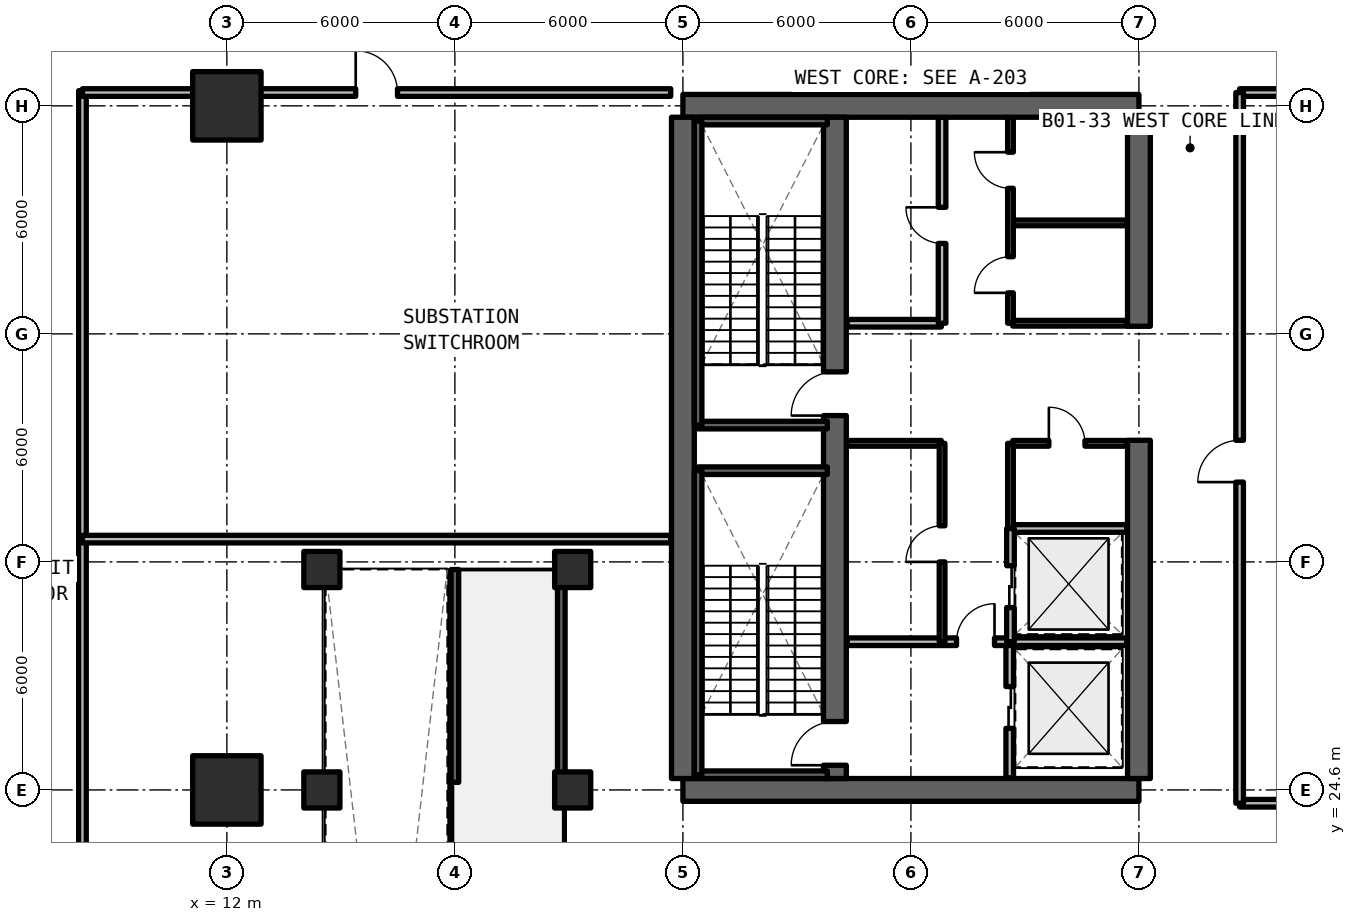
"""IFC4 building model, lengths in metres.
Left out: names, types, materials, properties, quantities, classifications, styles, units other than length and angle.
Written with IfcOpenShell. Run it as: python <this file> out.ifc"""

import sys

from ifc_helpers import new_model, si_unit, direction, frame, frame_2d, origin, origin_2d, place, context, subcontext, project, spatial, rectangle, extrude, element, fill, save


model = new_model("IFC4")
c1 = context("Model", 3, precision=1e-05, world=origin(), true_north=direction((0.0, 1.0)))
c2 = subcontext(c1, "Body", "Model", "MODEL_VIEW")
j1 = project(units=[si_unit("LENGTHUNIT", "METRE"), si_unit("PLANEANGLEUNIT", "RADIAN")], contexts=[c1])
p1 = place(None, origin())
s1 = spatial("IfcSite", under=j1, at=p1, CompositionType="ELEMENT")
p2 = place(p1, origin())
s2 = spatial("IfcBuilding", under=s1, at=p2, CompositionType="ELEMENT")
p3 = place(p2, frame((0.0, 0.0, -4.62)))
s3 = spatial("IfcBuildingStorey", under=s2, at=p3, CompositionType="ELEMENT", Elevation=-4.62)
for number, where, z_axis, x_axis in (
    (1, (24.0, 24.6, 0.0), (0.0, 0.0, 1.0), (1.0, 0.0, 0.0)),
    (2, (36.0, 42.6, 0.0), (0.0, 0.0, 1.0), (-1.0, 0.0, 0.0)),
):
    element("IfcWall", number, at=place(p3, frame(where, z_axis=z_axis, x_axis=x_axis)), inside=s3, PredefinedType="SHEAR", context=c2, shape_type="SweptSolid", body=[
        extrude(rectangle(XDim=12.0, YDim=0.6, at=frame_2d((6.0, 0.0))), origin(), (0.0, 0.0, 1.0), 4.62),
    ])
p4 = place(p3, frame((24.0, 24.9, 0.0), z_axis=(0.0, 0.0, 1.0), x_axis=(0.0, 1.0, 0.0)))
e3 = element("IfcWall", 3, at=p4, inside=s3, PredefinedType="SHEAR", context=c2, shape_type="SweptSolid", body=[
    extrude(rectangle(XDim=17.4, YDim=0.6, at=frame_2d((8.7, 0.0))), origin(), (0.0, 0.0, 1.0), 4.62),
])
p5 = place(p3, frame((36.0, 24.9, 0.0), z_axis=(0.0, 0.0, 1.0), x_axis=(0.0, 1.0, 0.0)))
e4 = element("IfcWall", 4, at=p5, inside=s3, PredefinedType="SHEAR", context=c2, shape_type="SweptSolid", body=[
    extrude(rectangle(XDim=8.9, YDim=0.6, at=frame_2d((4.45, 0.0))), origin(), (0.0, 0.0, 1.0), 4.62),
])
p6 = place(p3, frame((36.0, 36.8, 0.0), z_axis=(0.0, 0.0, 1.0), x_axis=(0.0, 1.0, 0.0)))
e5 = element("IfcWall", 5, at=p6, inside=s3, PredefinedType="SHEAR", context=c2, shape_type="SweptSolid", body=[
    extrude(rectangle(XDim=5.5, YDim=0.6, at=frame_2d((2.75, 0.0))), origin(), (0.0, 0.0, 1.0), 4.62),
])
p7 = place(p3, frame((28.0, 24.9, 0.0), z_axis=(0.0, 0.0, 1.0), x_axis=(0.0, 1.0, 0.0)))
e6 = element("IfcWall", 6, at=p7, inside=s3, PredefinedType="SHEAR", context=c2, shape_type="SweptSolid", body=[
    extrude(rectangle(XDim=17.4, YDim=0.6, at=frame_2d((8.7, 0.0))), origin(), (0.0, 0.0, 1.0), 4.62),
])
p8 = place(p7, frame((0.35, 0.0, 0.0)))
e7 = element("IfcOpeningElement", 7, at=p8, cuts=e6, PredefinedType="OPENING", context=c2, shape_type="SweptSolid", body=[
    extrude(rectangle(XDim=1.15, YDim=2.15, at=frame_2d((0.575, 1.075))), frame((0.0, 0.31, 0.0), z_axis=(0.0, -1.0, 0.0), x_axis=(1.0, 0.0, 0.0)), (0.0, 0.0, 1.0), 0.62),
])
p9 = place(p7, frame((9.55, 0.0, 0.0)))
e8 = element("IfcOpeningElement", 8, at=p9, cuts=e6, PredefinedType="OPENING", context=c2, shape_type="SweptSolid", body=[
    extrude(rectangle(XDim=1.15, YDim=2.15, at=frame_2d((0.575, 1.075))), frame((0.0, 0.31, 0.0), z_axis=(0.0, -1.0, 0.0), x_axis=(1.0, 0.0, 0.0)), (0.0, 0.0, 1.0), 0.62),
])
for number, where, z_axis, x_axis in (
    (9, (12.0, 24.6, 0.0), (0.0, 0.0, 1.0), (1.0, 0.0, 0.0)),
    (10, (12.0, 42.6, 0.0), (0.0, 0.0, 1.0), (1.0, 0.0, 0.0)),
):
    element("IfcColumn", number, at=place(p3, frame(where, z_axis=z_axis, x_axis=x_axis)), inside=s3, PredefinedType="COLUMN", context=c2, shape_type="SweptSolid", body=[
        extrude(rectangle(XDim=1.8, YDim=1.8, at=origin_2d()), origin(), (0.0, 0.0, 1.0), 4.62),
    ])
for number, where, z_axis, x_axis in (
    (11, (14.5, 30.4, 0.0), (0.0, 0.0, 1.0), (1.0, 0.0, 0.0)),
    (12, (21.1, 30.4, 0.0), (0.0, 0.0, 1.0), (1.0, 0.0, 0.0)),
    (13, (14.5, 24.6, 0.0), (0.0, 0.0, 1.0), (1.0, 0.0, 0.0)),
    (14, (21.1, 24.6, 0.0), (0.0, 0.0, 1.0), (1.0, 0.0, 0.0)),
):
    element("IfcColumn", number, at=place(p3, frame(where, z_axis=z_axis, x_axis=x_axis)), inside=s3, PredefinedType="COLUMN", context=c2, shape_type="SweptSolid", body=[
        extrude(rectangle(XDim=0.95, YDim=0.95, at=origin_2d()), origin(), (0.0, 0.0, 1.0), 4.34),
    ])
p10 = place(p3, frame((32.6, 24.92, 0.0), z_axis=(0.0, 0.0, 1.0), x_axis=(0.0, 1.0, 0.0)))
e15 = element("IfcWall", 15, at=p10, inside=s3, PredefinedType="SOLIDWALL", context=c2, shape_type="SweptSolid", body=[
    extrude(rectangle(XDim=3.58, YDim=0.2, at=frame_2d((1.79, 0.0))), origin(), (0.0, 0.0, 1.0), 3.56),
])
p11 = place(p10, frame((1.3, 0.0, 0.0)))
e16 = element("IfcOpeningElement", 16, at=p11, cuts=e15, PredefinedType="OPENING", context=c2, shape_type="SweptSolid", body=[
    extrude(rectangle(XDim=1.1, YDim=2.2, at=frame_2d((0.55, 1.1))), frame((0.0, 0.11, 0.0), z_axis=(0.0, -1.0, 0.0), x_axis=(1.0, 0.0, 0.0)), (0.0, 0.0, 1.0), 0.22),
])
p12 = place(p3, frame((28.32, 28.5, 0.0), z_axis=(0.0, 0.0, 1.0), x_axis=(1.0, 0.0, 0.0)))
e17 = element("IfcWall", 17, at=p12, inside=s3, PredefinedType="SOLIDWALL", context=c2, shape_type="SweptSolid", body=[
    extrude(rectangle(XDim=7.36, YDim=0.2, at=frame_2d((3.68, 0.0))), origin(), (0.0, 0.0, 1.0), 3.56),
])
p13 = place(p12, frame((2.88, 0.0, 0.0)))
e18 = element("IfcOpeningElement", 18, at=p13, cuts=e17, PredefinedType="OPENING", context=c2, shape_type="SweptSolid", body=[
    extrude(rectangle(XDim=1.0, YDim=2.15, at=frame_2d((0.5, 1.075))), frame((0.0, 0.11, 0.0), z_axis=(0.0, -1.0, 0.0), x_axis=(1.0, 0.0, 0.0)), (0.0, 0.0, 1.0), 0.22),
])
p14 = place(p3, frame((28.32, 33.72, 0.0), z_axis=(0.0, 0.0, 1.0), x_axis=(1.0, 0.0, 0.0)))
e19 = element("IfcWall", 19, at=p14, inside=s3, PredefinedType="SOLIDWALL", context=c2, shape_type="SweptSolid", body=[
    extrude(rectangle(XDim=2.48, YDim=0.15, at=frame_2d((1.24, 0.0))), origin(), (0.0, 0.0, 1.0), 3.56),
])
p15 = place(p3, frame((30.82, 28.5, 0.0), z_axis=(0.0, 0.0, 1.0), x_axis=(0.0, 1.0, 0.0)))
e20 = element("IfcWall", 20, at=p15, inside=s3, PredefinedType="SOLIDWALL", context=c2, shape_type="SweptSolid", body=[
    extrude(rectangle(XDim=5.22, YDim=0.15, at=frame_2d((2.61, 0.0))), origin(), (0.0, 0.0, 1.0), 3.56),
])
p16 = place(p15, frame((2.1, 0.0, 0.0)))
e21 = element("IfcOpeningElement", 21, at=p16, cuts=e20, PredefinedType="OPENING", context=c2, shape_type="SweptSolid", body=[
    extrude(rectangle(XDim=0.95, YDim=2.15, at=frame_2d((0.475, 1.075))), frame((0.0, 0.085, 0.0), z_axis=(0.0, -1.0, 0.0), x_axis=(1.0, 0.0, 0.0)), (0.0, 0.0, 1.0), 0.17),
])
p17 = place(p3, frame((32.68, 31.48, 0.0), z_axis=(0.0, 0.0, 1.0), x_axis=(1.0, 0.0, 0.0)))
e22 = element("IfcWall", 22, at=p17, inside=s3, PredefinedType="SOLIDWALL", context=c2, shape_type="SweptSolid", body=[
    extrude(rectangle(XDim=3.0, YDim=0.2, at=frame_2d((1.5, 0.0))), origin(), (0.0, 0.0, 1.0), 3.56),
])
p18 = place(p3, frame((32.62, 28.5, 0.0), z_axis=(0.0, 0.0, 1.0), x_axis=(0.0, 1.0, 0.0)))
e23 = element("IfcWall", 23, at=p18, inside=s3, PredefinedType="SOLIDWALL", context=c2, shape_type="SweptSolid", body=[
    extrude(rectangle(XDim=2.98, YDim=0.2, at=frame_2d((1.49, 0.0))), origin(), (0.0, 0.0, 1.0), 3.56),
])
p19 = place(p18, frame((0.9, 0.0, 0.0)))
e24 = element("IfcOpeningElement", 24, at=p19, cuts=e23, PredefinedType="OPENING", context=c2, shape_type="SweptSolid", body=[
    extrude(rectangle(XDim=1.1, YDim=2.2, at=frame_2d((0.55, 1.1))), frame((0.0, 0.11, 0.0), z_axis=(0.0, -1.0, 0.0), x_axis=(1.0, 0.0, 0.0)), (0.0, 0.0, 1.0), 0.22),
])
p20 = place(p3, frame((32.62, 31.48, 0.0), z_axis=(0.0, 0.0, 1.0), x_axis=(0.0, 1.0, 0.0)))
e25 = element("IfcWall", 25, at=p20, inside=s3, PredefinedType="SOLIDWALL", context=c2, shape_type="SweptSolid", body=[
    extrude(rectangle(XDim=2.24, YDim=0.15, at=frame_2d((1.12, 0.0))), origin(), (0.0, 0.0, 1.0), 3.56),
])
p21 = place(p3, frame((32.68, 33.72, 0.0), z_axis=(0.0, 0.0, 1.0), x_axis=(1.0, 0.0, 0.0)))
e26 = element("IfcWall", 26, at=p21, inside=s3, PredefinedType="SOLIDWALL", context=c2, shape_type="SweptSolid", body=[
    extrude(rectangle(XDim=3.0, YDim=0.15, at=frame_2d((1.5, 0.0))), origin(), (0.0, 0.0, 1.0), 3.56),
])
p22 = place(p21, frame((0.95, 0.0, 0.0)))
e27 = element("IfcOpeningElement", 27, at=p22, cuts=e26, PredefinedType="OPENING", context=c2, shape_type="SweptSolid", body=[
    extrude(rectangle(XDim=0.95, YDim=2.15, at=frame_2d((0.475, 1.075))), frame((0.0, 0.085, 0.0), z_axis=(0.0, -1.0, 0.0), x_axis=(1.0, 0.0, 0.0)), (0.0, 0.0, 1.0), 0.17),
])
p23 = place(p3, frame((28.32, 36.88, 0.0), z_axis=(0.0, 0.0, 1.0), x_axis=(1.0, 0.0, 0.0)))
e28 = element("IfcWall", 28, at=p23, inside=s3, PredefinedType="SOLIDWALL", context=c2, shape_type="SweptSolid", body=[
    extrude(rectangle(XDim=2.48, YDim=0.2, at=frame_2d((1.24, 0.0))), origin(), (0.0, 0.0, 1.0), 3.56),
])
p24 = place(p3, frame((30.82, 36.88, 0.0), z_axis=(0.0, 0.0, 1.0), x_axis=(0.0, 1.0, 0.0)))
e29 = element("IfcWall", 29, at=p24, inside=s3, PredefinedType="SOLIDWALL", context=c2, shape_type="SweptSolid", body=[
    extrude(rectangle(XDim=5.42, YDim=0.2, at=frame_2d((2.71, 0.0))), origin(), (0.0, 0.0, 1.0), 3.56),
])
p25 = place(p24, frame((2.1, 0.0, 0.0)))
e30 = element("IfcOpeningElement", 30, at=p25, cuts=e29, PredefinedType="OPENING", context=c2, shape_type="SweptSolid", body=[
    extrude(rectangle(XDim=0.95, YDim=2.15, at=frame_2d((0.475, 1.075))), frame((0.0, 0.11, 0.0), z_axis=(0.0, -1.0, 0.0), x_axis=(1.0, 0.0, 0.0)), (0.0, 0.0, 1.0), 0.22),
])
for number, where, z_axis, x_axis in (
    (31, (32.68, 36.88, 0.0), (0.0, 0.0, 1.0), (1.0, 0.0, 0.0)),
    (32, (32.68, 39.52, 0.0), (0.0, 0.0, 1.0), (1.0, 0.0, 0.0)),
):
    element("IfcWall", number, at=place(p3, frame(where, z_axis=z_axis, x_axis=x_axis)), inside=s3, PredefinedType="SOLIDWALL", context=c2, shape_type="SweptSolid", body=[
        extrude(rectangle(XDim=3.0, YDim=0.15, at=frame_2d((1.5, 0.0))), origin(), (0.0, 0.0, 1.0), 3.56),
    ])
p26 = place(p3, frame((32.62, 36.88, 0.0), z_axis=(0.0, 0.0, 1.0), x_axis=(0.0, 1.0, 0.0)))
e33 = element("IfcWall", 33, at=p26, inside=s3, PredefinedType="SOLIDWALL", context=c2, shape_type="SweptSolid", body=[
    extrude(rectangle(XDim=5.42, YDim=0.15, at=frame_2d((2.71, 0.0))), origin(), (0.0, 0.0, 1.0), 3.56),
])
p27 = place(p26, frame((0.8, 0.0, 0.0)))
e34 = element("IfcOpeningElement", 34, at=p27, cuts=e33, PredefinedType="OPENING", context=c2, shape_type="SweptSolid", body=[
    extrude(rectangle(XDim=0.95, YDim=2.15, at=frame_2d((0.475, 1.075))), frame((0.0, 0.085, 0.0), z_axis=(0.0, -1.0, 0.0), x_axis=(1.0, 0.0, 0.0)), (0.0, 0.0, 1.0), 0.17),
])
p28 = place(p26, frame((3.55, 0.0, 0.0)))
e35 = element("IfcOpeningElement", 35, at=p28, cuts=e33, PredefinedType="OPENING", context=c2, shape_type="SweptSolid", body=[
    extrude(rectangle(XDim=0.95, YDim=2.15, at=frame_2d((0.475, 1.075))), frame((0.0, 0.085, 0.0), z_axis=(0.0, -1.0, 0.0), x_axis=(1.0, 0.0, 0.0)), (0.0, 0.0, 1.0), 0.17),
])
p29 = place(p3, frame((8.2, 15.9, 0.0), z_axis=(0.0, 0.0, 1.0), x_axis=(0.0, 1.0, 0.0)))
e36 = element("IfcWall", 36, at=p29, inside=s3, PredefinedType="SOLIDWALL", context=c2, shape_type="SweptSolid", body=[
    extrude(rectangle(XDim=27.1, YDim=0.2, at=frame_2d((13.55, 0.0))), origin(), (0.0, 0.0, 1.0), 3.56),
])
p30 = place(p3, frame((8.2, 31.2, 0.0), z_axis=(0.0, 0.0, 1.0), x_axis=(1.0, 0.0, 0.0)))
e37 = element("IfcWall", 37, at=p30, inside=s3, PredefinedType="SOLIDWALL", context=c2, shape_type="SweptSolid", body=[
    extrude(rectangle(XDim=15.48, YDim=0.2, at=frame_2d((7.74, 0.0))), origin(), (0.0, 0.0, 1.0), 3.56),
])
p31 = place(p3, frame((8.2, 42.95, 0.0), z_axis=(0.0, 0.0, 1.0), x_axis=(1.0, 0.0, 0.0)))
e38 = element("IfcWall", 38, at=p31, inside=s3, PredefinedType="SOLIDWALL", context=c2, shape_type="SweptSolid", body=[
    extrude(rectangle(XDim=15.48, YDim=0.2, at=frame_2d((7.74, 0.0))), origin(), (0.0, 0.0, 1.0), 3.56),
])
p32 = place(p31, frame((7.19, 0.0, 0.0)))
e39 = element("IfcOpeningElement", 39, at=p32, cuts=e38, PredefinedType="OPENING", context=c2, shape_type="SweptSolid", body=[
    extrude(rectangle(XDim=1.1, YDim=2.15, at=frame_2d((0.55, 1.075))), frame((0.0, 0.11, 0.0), z_axis=(0.0, -1.0, 0.0), x_axis=(1.0, 0.0, 0.0)), (0.0, 0.0, 1.0), 0.22),
])
for number, where, z_axis, x_axis in (
    (40, (38.65, 24.25, 0.0), (0.0, 0.0, 1.0), (1.0, 0.0, 0.0)),
    (41, (38.65, 42.95, 0.0), (0.0, 0.0, 1.0), (1.0, 0.0, 0.0)),
):
    element("IfcWall", number, at=place(p3, frame(where, z_axis=z_axis, x_axis=x_axis)), inside=s3, PredefinedType="SOLIDWALL", context=c2, shape_type="SweptSolid", body=[
        extrude(rectangle(XDim=36.7, YDim=0.2, at=frame_2d((18.35, 0.0))), origin(), (0.0, 0.0, 1.0), 3.56),
    ])
p33 = place(p3, frame((38.65, 24.25, 0.0), z_axis=(0.0, 0.0, 1.0), x_axis=(0.0, 1.0, 0.0)))
e42 = element("IfcWall", 42, at=p33, inside=s3, PredefinedType="SOLIDWALL", context=c2, shape_type="SweptSolid", body=[
    extrude(rectangle(XDim=18.7, YDim=0.2, at=frame_2d((9.35, 0.0))), origin(), (0.0, 0.0, 1.0), 3.56),
])
p34 = place(p33, frame((8.45, 0.0, 0.0)))
e43 = element("IfcOpeningElement", 43, at=p34, cuts=e42, PredefinedType="OPENING", context=c2, shape_type="SweptSolid", body=[
    extrude(rectangle(XDim=1.1, YDim=2.15, at=frame_2d((0.55, 1.075))), frame((0.0, 0.11, 0.0), z_axis=(0.0, -1.0, 0.0), x_axis=(1.0, 0.0, 0.0)), (0.0, 0.0, 1.0), 0.22),
])
for number, where, z_axis, x_axis in (
    (44, (24.4, 25.0, 0.0), (0.0, 0.0, 1.0), (1.0, 0.0, 0.0)),
    (45, (27.8, 33.0, 0.0), (0.0, 0.0, 1.0), (-1.0, 0.0, 0.0)),
):
    element("IfcWall", number, at=place(p3, frame(where, z_axis=z_axis, x_axis=x_axis)), inside=s3, PredefinedType="SOLIDWALL", context=c2, shape_type="SweptSolid", body=[
        extrude(rectangle(XDim=3.4, YDim=0.2, at=frame_2d((1.7, 0.0))), origin(), (0.0, 0.0, 1.0), 4.62),
    ])
p35 = place(p3, frame((24.4, 33.0, 0.0), z_axis=(0.0, 0.0, 1.0), x_axis=(0.0, -1.0, 0.0)))
e46 = element("IfcWall", 46, at=p35, inside=s3, PredefinedType="SOLIDWALL", context=c2, shape_type="SweptSolid", body=[
    extrude(rectangle(XDim=8.0, YDim=0.2, at=frame_2d((4.0, 0.0))), origin(), (0.0, 0.0, 1.0), 4.62),
])
for number, where, z_axis, x_axis in (
    (47, (24.4, 34.2, 0.0), (0.0, 0.0, 1.0), (1.0, 0.0, 0.0)),
    (48, (27.8, 42.2, 0.0), (0.0, 0.0, 1.0), (-1.0, 0.0, 0.0)),
):
    element("IfcWall", number, at=place(p3, frame(where, z_axis=z_axis, x_axis=x_axis)), inside=s3, PredefinedType="SOLIDWALL", context=c2, shape_type="SweptSolid", body=[
        extrude(rectangle(XDim=3.4, YDim=0.2, at=frame_2d((1.7, 0.0))), origin(), (0.0, 0.0, 1.0), 4.62),
    ])
p36 = place(p3, frame((24.4, 42.2, 0.0), z_axis=(0.0, 0.0, 1.0), x_axis=(0.0, -1.0, 0.0)))
e49 = element("IfcWall", 49, at=p36, inside=s3, PredefinedType="SOLIDWALL", context=c2, shape_type="SweptSolid", body=[
    extrude(rectangle(XDim=8.0, YDim=0.2, at=frame_2d((4.0, 0.0))), origin(), (0.0, 0.0, 1.0), 4.62),
])
for number, where, z_axis, x_axis in (
    (50, (18.0, 24.8, 0.0), (0.0, 0.0, 1.0), (0.0, 1.0, 0.0)),
    (51, (20.8, 24.8, 0.0), (0.0, 0.0, 1.0), (0.0, 1.0, 0.0)),
):
    element("IfcWall", number, at=place(p3, frame(where, z_axis=z_axis, x_axis=x_axis)), inside=s3, PredefinedType="SOLIDWALL", context=c2, shape_type="SweptSolid", body=[
        extrude(rectangle(XDim=5.6, YDim=0.2, at=frame_2d((2.8, 0.0))), origin(), (0.0, 0.0, 1.0), 4.37),
    ])
p37 = place(p11, origin())
e52 = element("IfcDoor", 52, at=p37, inside=s3, OperationType="SLIDING_TO_LEFT", PredefinedType="DOOR", context=c2, shape_type="SweptSolid", body=[
    extrude(rectangle(XDim=1.1, YDim=2.2, at=frame_2d((0.55, 1.1))), frame((0.0, 0.025, 0.0), z_axis=(0.0, -1.0, 0.0), x_axis=(1.0, 0.0, 0.0)), (0.0, 0.0, 1.0), 0.05),
])
fill(e16, e52)
p38 = place(p13, origin())
e53 = element("IfcDoor", 53, at=p38, inside=s3, OperationType="SINGLE_SWING_RIGHT", PredefinedType="DOOR", context=c2, shape_type="SweptSolid", body=[
    extrude(rectangle(XDim=1.0, YDim=2.15, at=frame_2d((0.5, 1.075))), frame((0.0, 0.025, 0.0), z_axis=(0.0, -1.0, 0.0), x_axis=(1.0, 0.0, 0.0)), (0.0, 0.0, 1.0), 0.05),
])
fill(e18, e53)
p39 = place(p16, origin())
e54 = element("IfcDoor", 54, at=p39, inside=s3, OperationType="SINGLE_SWING_LEFT", PredefinedType="DOOR", context=c2, shape_type="SweptSolid", body=[
    extrude(rectangle(XDim=0.95, YDim=2.15, at=frame_2d((0.475, 1.075))), frame((0.0, 0.025, 0.0), z_axis=(0.0, -1.0, 0.0), x_axis=(1.0, 0.0, 0.0)), (0.0, 0.0, 1.0), 0.05),
])
fill(e21, e54)
p40 = place(p19, origin())
e55 = element("IfcDoor", 55, at=p40, inside=s3, OperationType="SLIDING_TO_LEFT", PredefinedType="DOOR", context=c2, shape_type="SweptSolid", body=[
    extrude(rectangle(XDim=1.1, YDim=2.2, at=frame_2d((0.55, 1.1))), frame((0.0, 0.025, 0.0), z_axis=(0.0, -1.0, 0.0), x_axis=(1.0, 0.0, 0.0)), (0.0, 0.0, 1.0), 0.05),
])
fill(e24, e55)
p41 = place(p22, origin())
e56 = element("IfcDoor", 56, at=p41, inside=s3, OperationType="SINGLE_SWING_LEFT", PredefinedType="DOOR", context=c2, shape_type="SweptSolid", body=[
    extrude(rectangle(XDim=0.95, YDim=2.15, at=frame_2d((0.475, 1.075))), frame((0.0, 0.025, 0.0), z_axis=(0.0, -1.0, 0.0), x_axis=(1.0, 0.0, 0.0)), (0.0, 0.0, 1.0), 0.05),
])
fill(e27, e56)
p42 = place(p25, origin())
e57 = element("IfcDoor", 57, at=p42, inside=s3, OperationType="SINGLE_SWING_RIGHT", PredefinedType="DOOR", context=c2, shape_type="SweptSolid", body=[
    extrude(rectangle(XDim=0.95, YDim=2.15, at=frame_2d((0.475, 1.075))), frame((0.0, 0.025, 0.0), z_axis=(0.0, -1.0, 0.0), x_axis=(1.0, 0.0, 0.0)), (0.0, 0.0, 1.0), 0.05),
])
fill(e30, e57)
p43 = place(p27, origin())
e58 = element("IfcDoor", 58, at=p43, inside=s3, OperationType="SINGLE_SWING_LEFT", PredefinedType="DOOR", context=c2, shape_type="SweptSolid", body=[
    extrude(rectangle(XDim=0.95, YDim=2.15, at=frame_2d((0.475, 1.075))), frame((0.0, 0.025, 0.0), z_axis=(0.0, -1.0, 0.0), x_axis=(1.0, 0.0, 0.0)), (0.0, 0.0, 1.0), 0.05),
])
fill(e34, e58)
p44 = place(p28, origin())
e59 = element("IfcDoor", 59, at=p44, inside=s3, OperationType="SINGLE_SWING_RIGHT", PredefinedType="DOOR", context=c2, shape_type="SweptSolid", body=[
    extrude(rectangle(XDim=0.95, YDim=2.15, at=frame_2d((0.475, 1.075))), frame((0.0, 0.025, 0.0), z_axis=(0.0, -1.0, 0.0), x_axis=(1.0, 0.0, 0.0)), (0.0, 0.0, 1.0), 0.05),
])
fill(e35, e59)
p45 = place(p32, origin())
e60 = element("IfcDoor", 60, at=p45, inside=s3, OperationType="SINGLE_SWING_LEFT", PredefinedType="DOOR", context=c2, shape_type="SweptSolid", body=[
    extrude(rectangle(XDim=1.1, YDim=2.15, at=frame_2d((0.55, 1.075))), frame((0.0, 0.025, 0.0), z_axis=(0.0, -1.0, 0.0), x_axis=(1.0, 0.0, 0.0)), (0.0, 0.0, 1.0), 0.05),
])
fill(e39, e60)
p46 = place(p34, origin())
e61 = element("IfcDoor", 61, at=p46, inside=s3, OperationType="SINGLE_SWING_LEFT", PredefinedType="DOOR", context=c2, shape_type="SweptSolid", body=[
    extrude(rectangle(XDim=1.1, YDim=2.15, at=frame_2d((0.55, 1.075))), frame((0.0, 0.025, 0.0), z_axis=(0.0, -1.0, 0.0), x_axis=(1.0, 0.0, 0.0)), (0.0, 0.0, 1.0), 0.05),
])
fill(e43, e61)
p47 = place(p8, origin())
e62 = element("IfcDoor", 62, at=p47, inside=s3, OperationType="SINGLE_SWING_RIGHT", PredefinedType="DOOR", context=c2, shape_type="SweptSolid", body=[
    extrude(rectangle(XDim=1.15, YDim=2.15, at=frame_2d((0.575, 1.075))), frame((0.0, 0.025, 0.0), z_axis=(0.0, -1.0, 0.0), x_axis=(1.0, 0.0, 0.0)), (0.0, 0.0, 1.0), 0.05),
])
fill(e7, e62)
p48 = place(p9, origin())
e63 = element("IfcDoor", 63, at=p48, inside=s3, OperationType="SINGLE_SWING_LEFT", PredefinedType="DOOR", context=c2, shape_type="SweptSolid", body=[
    extrude(rectangle(XDim=1.15, YDim=2.15, at=frame_2d((0.575, 1.075))), frame((0.0, 0.025, 0.0), z_axis=(0.0, -1.0, 0.0), x_axis=(1.0, 0.0, 0.0)), (0.0, 0.0, 1.0), 0.05),
])
fill(e8, e63)
save(model, sys.argv[1])
